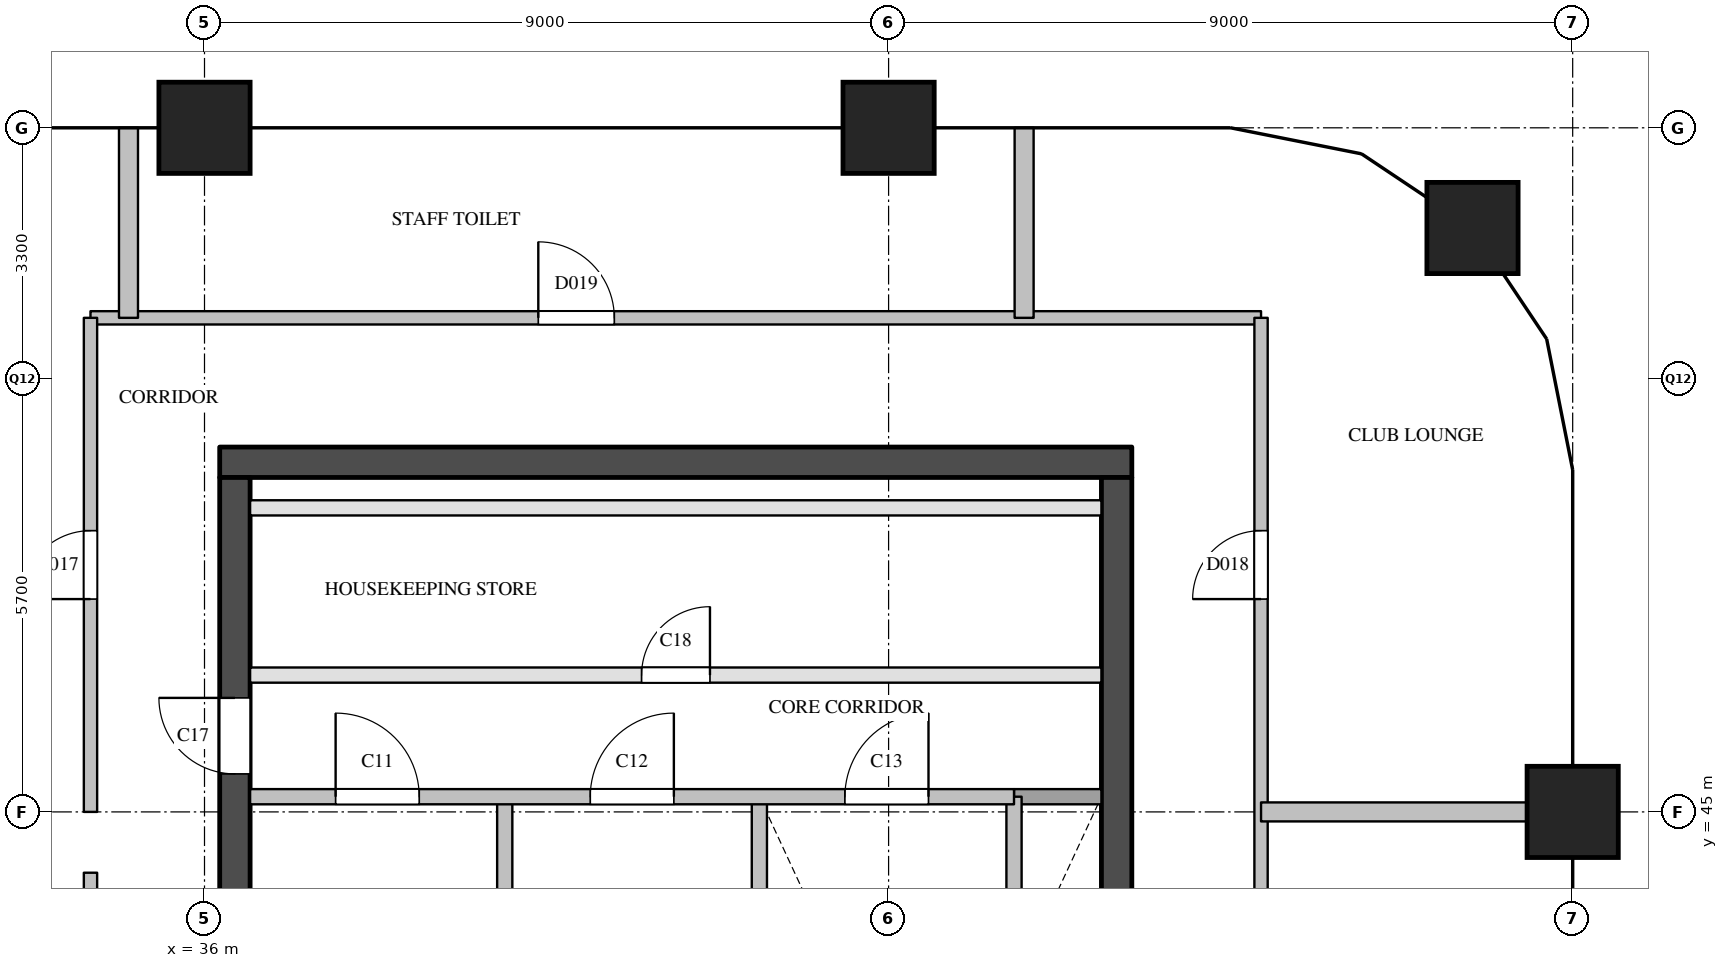
"""IFC4 building model, lengths in metres.
Left out: names, types, materials, properties, quantities, classifications, styles, units other than length and angle.
Written with IfcOpenShell. Run it as: python <this file> out.ifc"""

import sys

from ifc_helpers import new_model, si_unit, direction, frame, frame_2d, origin, origin_2d, place, context, subcontext, project, spatial, rectangle, extrude, element, fill, save


model = new_model("IFC4")
c1 = context("Model", 3, precision=1e-05, world=origin(), true_north=direction((0.0, 1.0)))
c2 = subcontext(c1, "Body", "Model", "MODEL_VIEW")
j1 = project(units=[si_unit("LENGTHUNIT", "METRE"), si_unit("PLANEANGLEUNIT", "RADIAN")], contexts=[c1])
p1 = place(None, origin())
s1 = spatial("IfcSite", under=j1, at=p1, CompositionType="ELEMENT")
p2 = place(p1, origin())
s2 = spatial("IfcBuilding", under=s1, at=p2, CompositionType="ELEMENT")
p3 = place(p2, frame((0.0, 0.0, 254.0)))
s3 = spatial("IfcBuildingStorey", under=s2, at=p3, CompositionType="ELEMENT", Elevation=254.0)
for number, where, z_axis, x_axis in (
    (1, (36.0, 54.0, 0.0), (0.0, 0.0, 1.0), (1.0, 0.0, 0.0)),
    (2, (45.0, 54.0, 0.0), (0.0, 0.0, 1.0), (1.0, 0.0, 0.0)),
    (3, (54.0, 45.0, 0.0), (0.0, 0.0, 1.0), (1.0, 0.0, 0.0)),
    (4, (52.682, 52.682, 0.0), (0.0, 0.0, 1.0), (1.0, 0.0, 0.0)),
):
    element("IfcColumn", number, at=place(p3, frame(where, z_axis=z_axis, x_axis=x_axis)), inside=s3, PredefinedType="COLUMN", context=c2, shape_type="SweptSolid", body=[
        extrude(rectangle(XDim=1.2, YDim=1.2, at=origin_2d()), origin(), (0.0, 0.0, 1.0), 3.9),
    ])
p4 = place(p3, frame((36.2, 49.6, 0.0), z_axis=(0.0, 0.0, 1.0), x_axis=(1.0, 0.0, 0.0)))
e5 = element("IfcWall", 5, at=p4, inside=s3, PredefinedType="SHEAR", context=c2, shape_type="SweptSolid", body=[
    extrude(rectangle(XDim=12.0, YDim=0.4, at=frame_2d((6.0, 0.0))), origin(), (0.0, 0.0, 1.0), 3.6),
])
p5 = place(p3, frame((36.4, 29.1, 0.0), z_axis=(0.0, 0.0, 1.0), x_axis=(0.0, 1.0, 0.0)))
e6 = element("IfcWall", 6, at=p5, inside=s3, PredefinedType="SHEAR", context=c2, shape_type="SweptSolid", body=[
    extrude(rectangle(XDim=20.3, YDim=0.4, at=frame_2d((10.15, 0.0))), origin(), (0.0, 0.0, 1.0), 3.6),
])
p6 = place(p5, frame((3.6, 0.0, 0.0)))
e7 = element("IfcOpeningElement", 7, at=p6, cuts=e6, PredefinedType="OPENING", context=c2, shape_type="SweptSolid", body=[
    extrude(rectangle(XDim=1.8, YDim=2.1, at=frame_2d((0.9, 1.05))), frame((0.0, 0.21, 0.0), z_axis=(0.0, -1.0, 0.0), x_axis=(1.0, 0.0, 0.0)), (0.0, 0.0, 1.0), 0.42),
])
p7 = place(p5, frame((16.4, 0.0, 0.0)))
e8 = element("IfcOpeningElement", 8, at=p7, cuts=e6, PredefinedType="OPENING", context=c2, shape_type="SweptSolid", body=[
    extrude(rectangle(XDim=1.0, YDim=2.1, at=frame_2d((0.5, 1.05))), frame((0.0, 0.21, 0.0), z_axis=(0.0, -1.0, 0.0), x_axis=(1.0, 0.0, 0.0)), (0.0, 0.0, 1.0), 0.42),
])
p8 = place(p3, frame((48.0, 29.1, 0.0), z_axis=(0.0, 0.0, 1.0), x_axis=(0.0, 1.0, 0.0)))
e9 = element("IfcWall", 9, at=p8, inside=s3, PredefinedType="SHEAR", context=c2, shape_type="SweptSolid", body=[
    extrude(rectangle(XDim=20.3, YDim=0.4, at=frame_2d((10.15, 0.0))), origin(), (0.0, 0.0, 1.0), 3.6),
])
p9 = place(p8, frame((12.5, 0.0, 0.0)))
e10 = element("IfcOpeningElement", 10, at=p9, cuts=e9, PredefinedType="OPENING", context=c2, shape_type="SweptSolid", body=[
    extrude(rectangle(XDim=0.7, YDim=2.1, at=frame_2d((0.35, 1.05))), frame((0.0, 0.21, 0.0), z_axis=(0.0, -1.0, 0.0), x_axis=(1.0, 0.0, 0.0)), (0.0, 0.0, 1.0), 0.42),
])
p10 = place(p8, frame((3.9, 0.0, 0.0)))
e11 = element("IfcOpeningElement", 11, at=p10, cuts=e9, PredefinedType="OPENING", context=c2, shape_type="SweptSolid", body=[
    extrude(rectangle(XDim=1.8, YDim=2.1, at=frame_2d((0.9, 1.05))), frame((0.0, 0.21, 0.0), z_axis=(0.0, -1.0, 0.0), x_axis=(1.0, 0.0, 0.0)), (0.0, 0.0, 1.0), 0.42),
])
for number, where, z_axis, x_axis in (
    (12, (39.95, 40.78, 0.0), (0.0, 0.0, 1.0), (0.0, 1.0, 0.0)),
    (13, (43.3, 40.78, 0.0), (0.0, 0.0, 1.0), (0.0, 1.0, 0.0)),
    (14, (46.65, 40.78, 0.0), (0.0, 0.0, 1.0), (0.0, 1.0, 0.0)),
):
    element("IfcWall", number, at=place(p3, frame(where, z_axis=z_axis, x_axis=x_axis)), inside=s3, PredefinedType="SOLIDWALL", context=c2, shape_type="SweptSolid", body=[
        extrude(rectangle(XDim=4.42, YDim=0.2, at=frame_2d((2.21, 0.0))), origin(), (0.0, 0.0, 1.0), 3.6),
    ])
p11 = place(p3, frame((46.65, 45.2, 0.0), z_axis=(0.0, 0.0, 1.0), x_axis=(1.0, 0.0, 0.0)))
e15 = element("IfcWall", 15, at=p11, inside=s3, PredefinedType="SOLIDWALL", context=c2, shape_type="SweptSolid", body=[
    extrude(rectangle(XDim=1.15, YDim=0.2, at=frame_2d((0.575, 0.0))), origin(), (0.0, 0.0, 1.0), 3.6),
])
p12 = place(p3, frame((36.6, 45.2, 0.0), z_axis=(0.0, 0.0, 1.0), x_axis=(1.0, 0.0, 0.0)))
e16 = element("IfcWall", 16, at=p12, inside=s3, PredefinedType="SOLIDWALL", context=c2, shape_type="SweptSolid", body=[
    extrude(rectangle(XDim=10.05, YDim=0.2, at=frame_2d((5.025, 0.0))), origin(), (0.0, 0.0, 1.0), 3.6),
])
p13 = place(p12, frame((1.125, 0.0, 0.0)))
e17 = element("IfcOpeningElement", 17, at=p13, cuts=e16, PredefinedType="OPENING", context=c2, shape_type="SweptSolid", body=[
    extrude(rectangle(XDim=1.1, YDim=2.1, at=frame_2d((0.55, 1.05))), frame((0.0, 0.11, 0.0), z_axis=(0.0, -1.0, 0.0), x_axis=(1.0, 0.0, 0.0)), (0.0, 0.0, 1.0), 0.22),
])
p14 = place(p12, frame((4.475, 0.0, 0.0)))
e18 = element("IfcOpeningElement", 18, at=p14, cuts=e16, PredefinedType="OPENING", context=c2, shape_type="SweptSolid", body=[
    extrude(rectangle(XDim=1.1, YDim=2.1, at=frame_2d((0.55, 1.05))), frame((0.0, 0.11, 0.0), z_axis=(0.0, -1.0, 0.0), x_axis=(1.0, 0.0, 0.0)), (0.0, 0.0, 1.0), 0.22),
])
p15 = place(p12, frame((7.825, 0.0, 0.0)))
e19 = element("IfcOpeningElement", 19, at=p15, cuts=e16, PredefinedType="OPENING", context=c2, shape_type="SweptSolid", body=[
    extrude(rectangle(XDim=1.1, YDim=2.1, at=frame_2d((0.55, 1.05))), frame((0.0, 0.11, 0.0), z_axis=(0.0, -1.0, 0.0), x_axis=(1.0, 0.0, 0.0)), (0.0, 0.0, 1.0), 0.22),
])
p16 = place(p3, frame((36.6, 46.8, 0.0), z_axis=(0.0, 0.0, 1.0), x_axis=(1.0, 0.0, 0.0)))
e20 = element("IfcWall", 20, at=p16, inside=s3, PredefinedType="PARTITIONING", context=c2, shape_type="SweptSolid", body=[
    extrude(rectangle(XDim=11.2, YDim=0.2, at=frame_2d((5.6, 0.0))), origin(), (0.0, 0.0, 1.0), 3.6),
])
p17 = place(p16, frame((5.15, 0.0, 0.0)))
e21 = element("IfcOpeningElement", 21, at=p17, cuts=e20, PredefinedType="OPENING", context=c2, shape_type="SweptSolid", body=[
    extrude(rectangle(XDim=0.9, YDim=2.1, at=frame_2d((0.45, 1.05))), frame((0.0, 0.11, 0.0), z_axis=(0.0, -1.0, 0.0), x_axis=(1.0, 0.0, 0.0)), (0.0, 0.0, 1.0), 0.22),
])
p18 = place(p3, frame((36.6, 49.0, 0.0), z_axis=(0.0, 0.0, 1.0), x_axis=(1.0, 0.0, 0.0)))
e22 = element("IfcWall", 22, at=p18, inside=s3, PredefinedType="PARTITIONING", context=c2, shape_type="SweptSolid", body=[
    extrude(rectangle(XDim=11.2, YDim=0.2, at=frame_2d((5.6, 0.0))), origin(), (0.0, 0.0, 1.0), 3.6),
])
p19 = place(p3, frame((34.5, 51.5, 0.0), z_axis=(0.0, 0.0, 1.0), x_axis=(1.0, 0.0, 0.0)))
e23 = element("IfcWall", 23, at=p19, inside=s3, PredefinedType="PARTITIONING", context=c2, shape_type="SweptSolid", body=[
    extrude(rectangle(XDim=15.4, YDim=0.175, at=frame_2d((7.7, 0.0))), origin(), (0.0, 0.0, 1.0), 3.6),
])
p20 = place(p19, frame((5.892, 0.0, 0.0)))
e24 = element("IfcOpeningElement", 24, at=p20, cuts=e23, PredefinedType="OPENING", context=c2, shape_type="SweptSolid", body=[
    extrude(rectangle(XDim=1.0, YDim=2.1, at=frame_2d((0.5, 1.05))), frame((0.0, 0.097, 0.0), z_axis=(0.0, -1.0, 0.0), x_axis=(1.0, 0.0, 0.0)), (0.0, 0.0, 1.0), 0.195),
])
p21 = place(p3, frame((34.5, 28.5, 0.0), z_axis=(0.0, 0.0, 1.0), x_axis=(0.0, 1.0, 0.0)))
e25 = element("IfcWall", 25, at=p21, inside=s3, PredefinedType="PARTITIONING", context=c2, shape_type="SweptSolid", body=[
    extrude(rectangle(XDim=15.7, YDim=0.175, at=frame_2d((7.85, 0.0))), origin(), (0.0, 0.0, 1.0), 3.6),
])
p22 = place(p21, frame((10.1, 0.0, 0.0)))
e26 = element("IfcOpeningElement", 26, at=p22, cuts=e25, PredefinedType="OPENING", context=c2, shape_type="SweptSolid", body=[
    extrude(rectangle(XDim=1.0, YDim=2.1, at=frame_2d((0.5, 1.05))), frame((0.0, 0.097, 0.0), z_axis=(0.0, -1.0, 0.0), x_axis=(1.0, 0.0, 0.0)), (0.0, 0.0, 1.0), 0.195),
])
p23 = place(p21, frame((11.9, 0.0, 0.0)))
e27 = element("IfcOpeningElement", 27, at=p23, cuts=e25, PredefinedType="OPENING", context=c2, shape_type="SweptSolid", body=[
    extrude(rectangle(XDim=1.0, YDim=2.1, at=frame_2d((0.5, 1.05))), frame((0.0, 0.097, 0.0), z_axis=(0.0, -1.0, 0.0), x_axis=(1.0, 0.0, 0.0)), (0.0, 0.0, 1.0), 0.195),
])
p24 = place(p3, frame((34.5, 45.0, 0.0), z_axis=(0.0, 0.0, 1.0), x_axis=(0.0, 1.0, 0.0)))
e28 = element("IfcWall", 28, at=p24, inside=s3, PredefinedType="PARTITIONING", context=c2, shape_type="SweptSolid", body=[
    extrude(rectangle(XDim=6.5, YDim=0.175, at=frame_2d((3.25, 0.0))), origin(), (0.0, 0.0, 1.0), 3.6),
])
p25 = place(p24, frame((2.8, 0.0, 0.0)))
e29 = element("IfcOpeningElement", 29, at=p25, cuts=e28, PredefinedType="OPENING", context=c2, shape_type="SweptSolid", body=[
    extrude(rectangle(XDim=0.9, YDim=2.1, at=frame_2d((0.45, 1.05))), frame((0.0, 0.097, 0.0), z_axis=(0.0, -1.0, 0.0), x_axis=(1.0, 0.0, 0.0)), (0.0, 0.0, 1.0), 0.195),
])
p26 = place(p3, frame((49.9, 28.5, 0.0), z_axis=(0.0, 0.0, 1.0), x_axis=(0.0, 1.0, 0.0)))
e30 = element("IfcWall", 30, at=p26, inside=s3, PredefinedType="PARTITIONING", context=c2, shape_type="SweptSolid", body=[
    extrude(rectangle(XDim=23.0, YDim=0.175, at=frame_2d((11.5, 0.0))), origin(), (0.0, 0.0, 1.0), 3.6),
])
p27 = place(p26, frame((7.8, 0.0, 0.0)))
e31 = element("IfcOpeningElement", 31, at=p27, cuts=e30, PredefinedType="OPENING", context=c2, shape_type="SweptSolid", body=[
    extrude(rectangle(XDim=0.9, YDim=2.1, at=frame_2d((0.45, 1.05))), frame((0.0, 0.097, 0.0), z_axis=(0.0, -1.0, 0.0), x_axis=(1.0, 0.0, 0.0)), (0.0, 0.0, 1.0), 0.195),
])
p28 = place(p26, frame((19.3, 0.0, 0.0)))
e32 = element("IfcOpeningElement", 32, at=p28, cuts=e30, PredefinedType="OPENING", context=c2, shape_type="SweptSolid", body=[
    extrude(rectangle(XDim=0.9, YDim=2.1, at=frame_2d((0.45, 1.05))), frame((0.0, 0.097, 0.0), z_axis=(0.0, -1.0, 0.0), x_axis=(1.0, 0.0, 0.0)), (0.0, 0.0, 1.0), 0.195),
])
p29 = place(p3, frame((49.9, 45.0, 0.0), z_axis=(0.0, 0.0, 1.0), x_axis=(1.0, 0.0, 0.0)))
e33 = element("IfcWall", 33, at=p29, inside=s3, PredefinedType="PARTITIONING", context=c2, shape_type="SweptSolid", body=[
    extrude(rectangle(XDim=4.1, YDim=0.25, at=frame_2d((2.05, 0.0))), origin(), (0.0, 0.0, 1.0), 3.6),
])
for number, where, z_axis, x_axis in (
    (34, (35.0, 51.5, 0.0), (0.0, 0.0, 1.0), (0.0, 1.0, 0.0)),
    (35, (46.783, 51.5, 0.0), (0.0, 0.0, 1.0), (0.0, 1.0, 0.0)),
):
    element("IfcWall", number, at=place(p3, frame(where, z_axis=z_axis, x_axis=x_axis)), inside=s3, PredefinedType="PARTITIONING", context=c2, shape_type="SweptSolid", body=[
        extrude(rectangle(XDim=2.5, YDim=0.25, at=frame_2d((1.25, 0.0))), origin(), (0.0, 0.0, 1.0), 2.6),
    ])
p30 = place(p13, origin())
e36 = element("IfcDoor", 36, at=p30, inside=s3, OperationType="SINGLE_SWING_LEFT", PredefinedType="DOOR", context=c2, shape_type="SweptSolid", body=[
    extrude(rectangle(XDim=1.1, YDim=2.1, at=frame_2d((0.55, 1.05))), frame((0.0, 0.025, 0.0), z_axis=(0.0, -1.0, 0.0), x_axis=(1.0, 0.0, 0.0)), (0.0, 0.0, 1.0), 0.05),
])
fill(e17, e36)
p31 = place(p14, origin())
e37 = element("IfcDoor", 37, at=p31, inside=s3, OperationType="SINGLE_SWING_RIGHT", PredefinedType="DOOR", context=c2, shape_type="SweptSolid", body=[
    extrude(rectangle(XDim=1.1, YDim=2.1, at=frame_2d((0.55, 1.05))), frame((0.0, 0.025, 0.0), z_axis=(0.0, -1.0, 0.0), x_axis=(1.0, 0.0, 0.0)), (0.0, 0.0, 1.0), 0.05),
])
fill(e18, e37)
p32 = place(p15, origin())
e38 = element("IfcDoor", 38, at=p32, inside=s3, OperationType="SINGLE_SWING_RIGHT", PredefinedType="DOOR", context=c2, shape_type="SweptSolid", body=[
    extrude(rectangle(XDim=1.1, YDim=2.1, at=frame_2d((0.55, 1.05))), frame((0.0, 0.025, 0.0), z_axis=(0.0, -1.0, 0.0), x_axis=(1.0, 0.0, 0.0)), (0.0, 0.0, 1.0), 0.05),
])
fill(e19, e38)
p33 = place(p7, origin())
e39 = element("IfcDoor", 39, at=p33, inside=s3, OperationType="SINGLE_SWING_RIGHT", PredefinedType="DOOR", context=c2, shape_type="SweptSolid", body=[
    extrude(rectangle(XDim=1.0, YDim=2.1, at=frame_2d((0.5, 1.05))), frame((0.0, 0.025, 0.0), z_axis=(0.0, -1.0, 0.0), x_axis=(1.0, 0.0, 0.0)), (0.0, 0.0, 1.0), 0.05),
])
fill(e8, e39)
p34 = place(p17, origin())
e40 = element("IfcDoor", 40, at=p34, inside=s3, OperationType="SINGLE_SWING_RIGHT", PredefinedType="DOOR", context=c2, shape_type="SweptSolid", body=[
    extrude(rectangle(XDim=0.9, YDim=2.1, at=frame_2d((0.45, 1.05))), frame((0.0, 0.025, 0.0), z_axis=(0.0, -1.0, 0.0), x_axis=(1.0, 0.0, 0.0)), (0.0, 0.0, 1.0), 0.05),
])
fill(e21, e40)
p35 = place(p25, origin())
e41 = element("IfcDoor", 41, at=p35, inside=s3, OperationType="SINGLE_SWING_LEFT", PredefinedType="DOOR", context=c2, shape_type="SweptSolid", body=[
    extrude(rectangle(XDim=0.9, YDim=2.1, at=frame_2d((0.45, 1.05))), frame((0.0, 0.025, 0.0), z_axis=(0.0, -1.0, 0.0), x_axis=(1.0, 0.0, 0.0)), (0.0, 0.0, 1.0), 0.05),
])
fill(e29, e41)
p36 = place(p28, origin())
e42 = element("IfcDoor", 42, at=p36, inside=s3, OperationType="SINGLE_SWING_LEFT", PredefinedType="DOOR", context=c2, shape_type="SweptSolid", body=[
    extrude(rectangle(XDim=0.9, YDim=2.1, at=frame_2d((0.45, 1.05))), frame((0.0, 0.025, 0.0), z_axis=(0.0, -1.0, 0.0), x_axis=(1.0, 0.0, 0.0)), (0.0, 0.0, 1.0), 0.05),
])
fill(e32, e42)
p37 = place(p20, origin())
e43 = element("IfcDoor", 43, at=p37, inside=s3, OperationType="SINGLE_SWING_LEFT", PredefinedType="DOOR", context=c2, shape_type="SweptSolid", body=[
    extrude(rectangle(XDim=1.0, YDim=2.1, at=frame_2d((0.5, 1.05))), frame((0.0, 0.025, 0.0), z_axis=(0.0, -1.0, 0.0), x_axis=(1.0, 0.0, 0.0)), (0.0, 0.0, 1.0), 0.05),
])
fill(e24, e43)
save(model, sys.argv[1])
